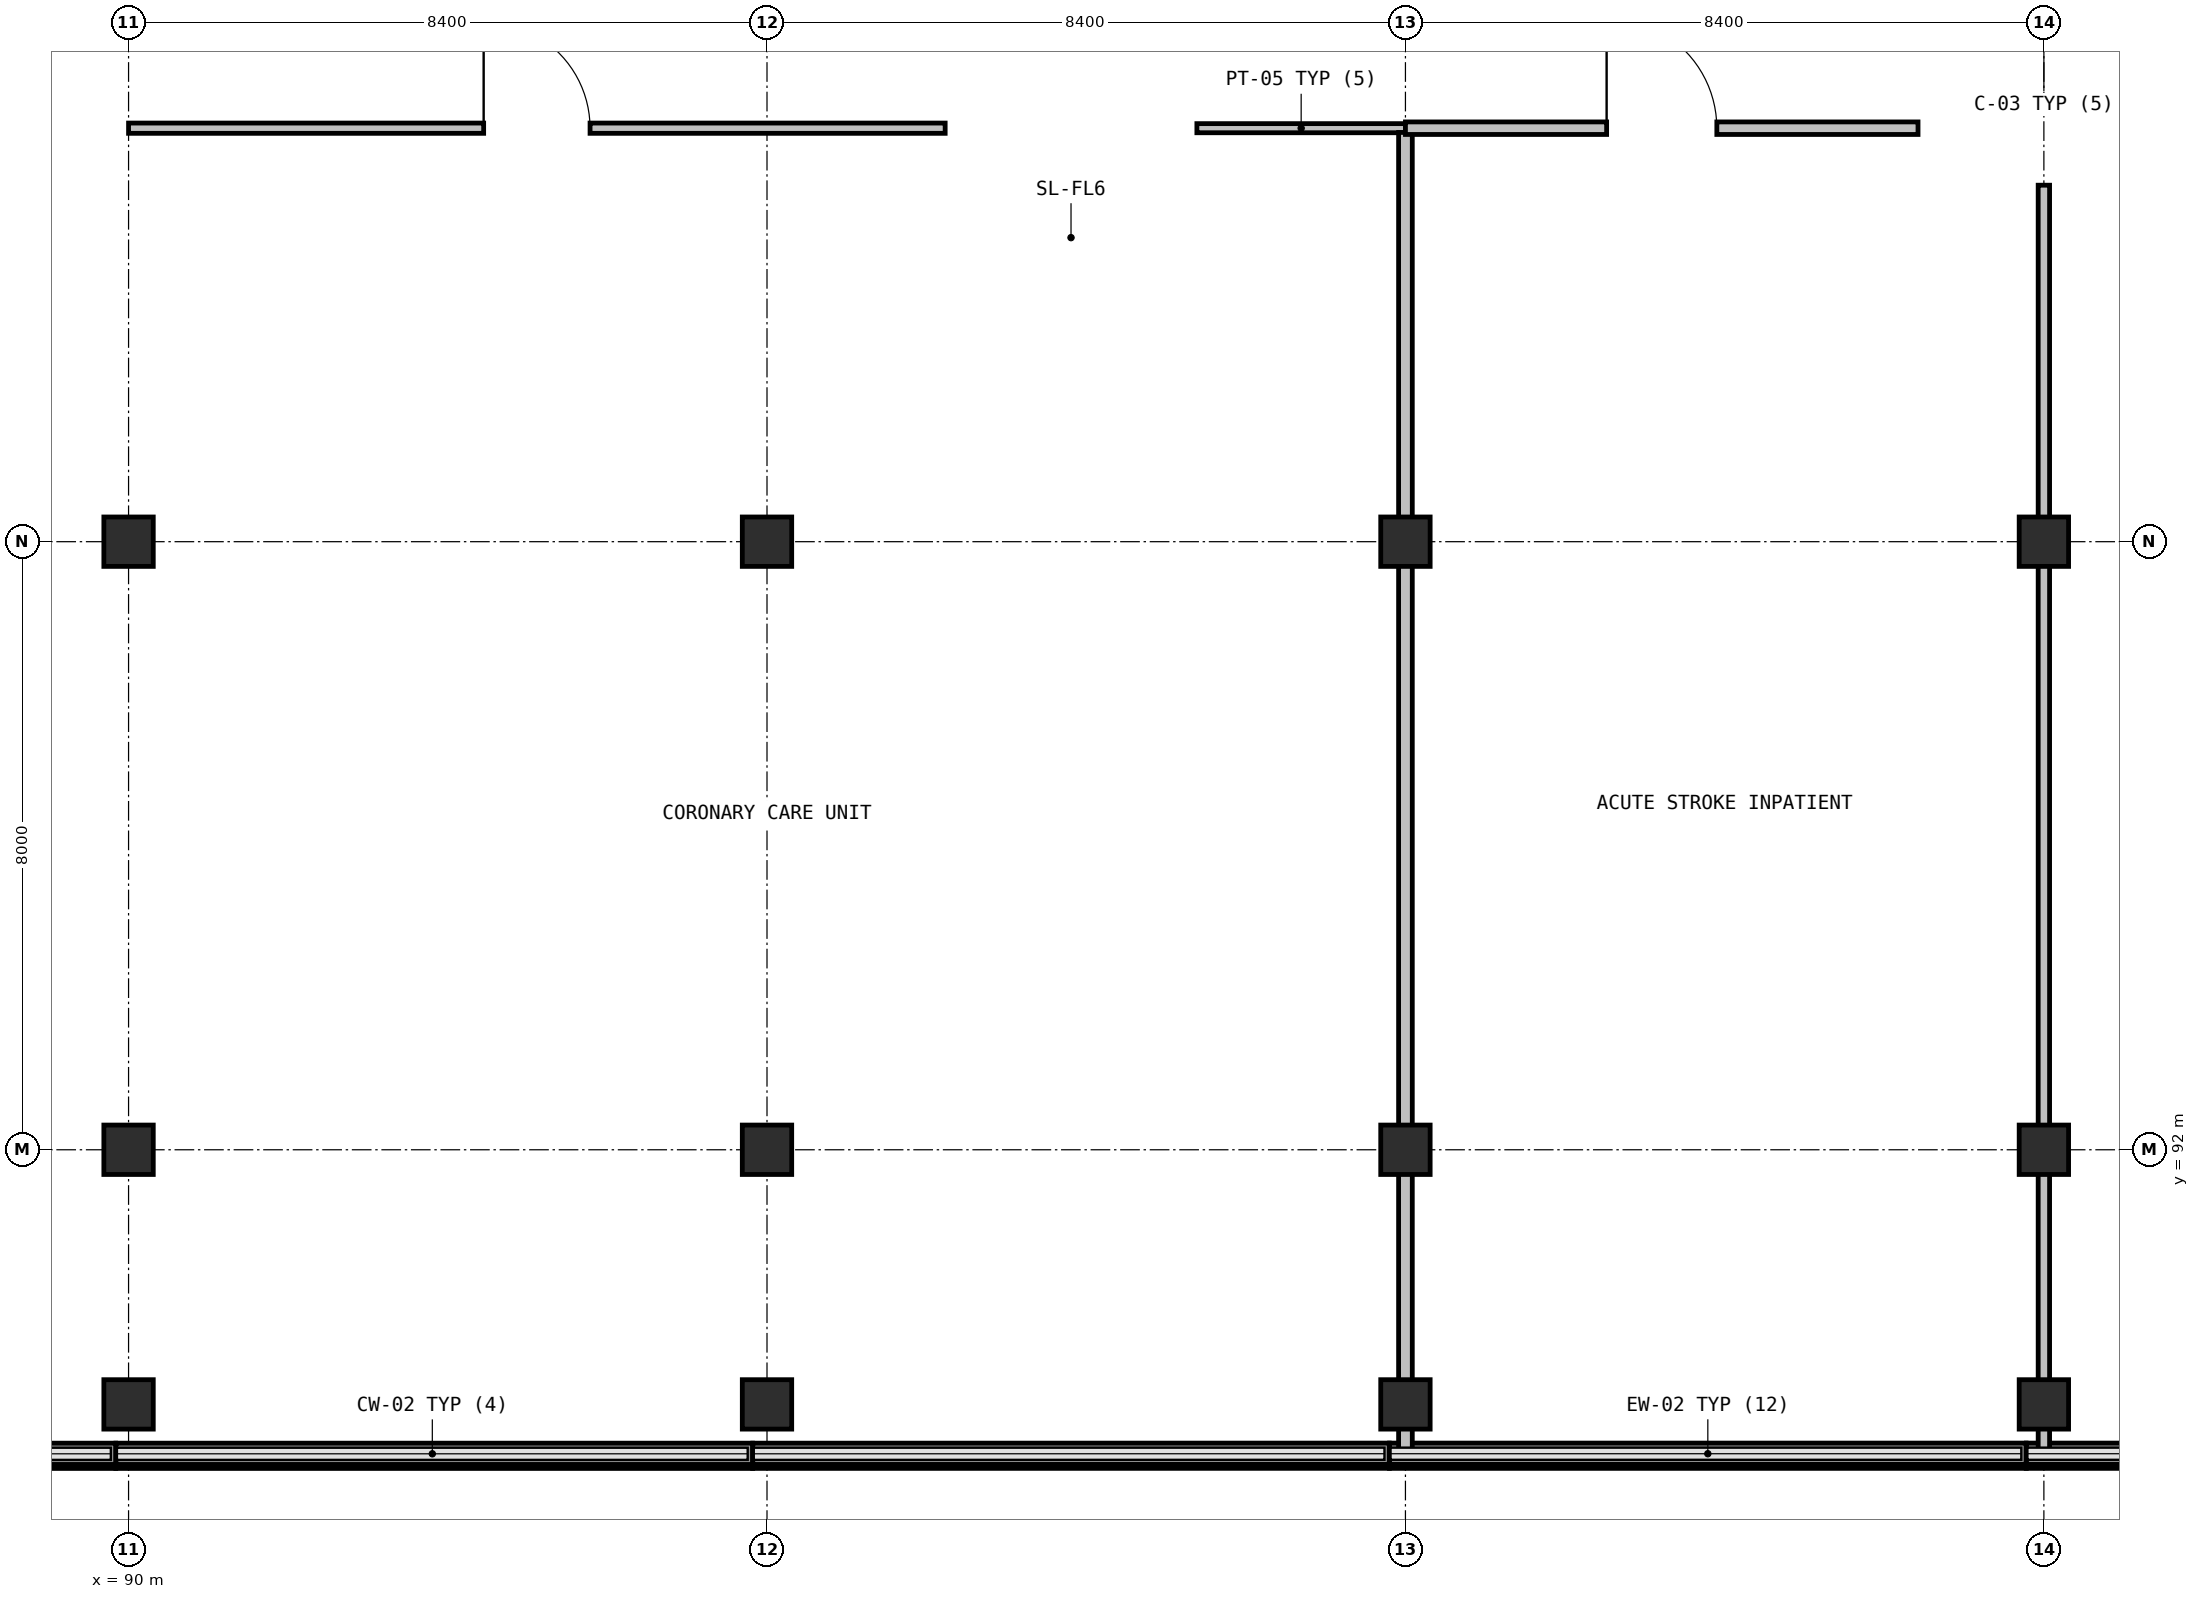
"""IFC4 building model, lengths in metres.
Left out: names, types, materials, properties, quantities, classifications, styles, units other than length and angle.
Written with IfcOpenShell. Run it as: python <this file> out.ifc"""

import sys

from ifc_helpers import new_model, si_unit, direction, frame, frame_2d, origin, origin_2d, place, context, subcontext, project, spatial, rectangle, extrude, element, fill, save


model = new_model("IFC4")
c1 = context("Model", 3, precision=1e-05, world=origin(), true_north=direction((0.0, 1.0)))
c2 = subcontext(c1, "Body", "Model", "MODEL_VIEW")
j1 = project(units=[si_unit("LENGTHUNIT", "METRE"), si_unit("PLANEANGLEUNIT", "RADIAN")], contexts=[c1])
p1 = place(None, origin())
s1 = spatial("IfcSite", under=j1, at=p1, CompositionType="ELEMENT")
p2 = place(p1, origin())
s2 = spatial("IfcBuilding", under=s1, at=p2, CompositionType="ELEMENT")
p3 = place(p2, frame((0.0, 0.0, 27.3)))
s3 = spatial("IfcBuildingStorey", under=s2, at=p3, CompositionType="ELEMENT", Elevation=27.3)
for number, where, z_axis, x_axis in (
    (1, (90.0, 88.65, 0.0), (0.0, 0.0, 1.0), (1.0, 0.0, 0.0)),
    (2, (90.0, 92.0, 0.0), (0.0, 0.0, 1.0), (1.0, 0.0, 0.0)),
    (3, (90.0, 100.0, 0.0), (0.0, 0.0, 1.0), (1.0, 0.0, 0.0)),
    (4, (98.4, 88.65, 0.0), (0.0, 0.0, 1.0), (1.0, 0.0, 0.0)),
    (5, (98.4, 92.0, 0.0), (0.0, 0.0, 1.0), (1.0, 0.0, 0.0)),
    (6, (98.4, 100.0, 0.0), (0.0, 0.0, 1.0), (1.0, 0.0, 0.0)),
    (7, (106.8, 88.65, 0.0), (0.0, 0.0, 1.0), (1.0, 0.0, 0.0)),
    (8, (106.8, 92.0, 0.0), (0.0, 0.0, 1.0), (1.0, 0.0, 0.0)),
    (9, (106.8, 100.0, 0.0), (0.0, 0.0, 1.0), (1.0, 0.0, 0.0)),
    (10, (115.2, 88.65, 0.0), (0.0, 0.0, 1.0), (1.0, 0.0, 0.0)),
    (11, (115.2, 92.0, 0.0), (0.0, 0.0, 1.0), (1.0, 0.0, 0.0)),
    (12, (115.2, 100.0, 0.0), (0.0, 0.0, 1.0), (1.0, 0.0, 0.0)),
):
    element("IfcColumn", number, at=place(p3, frame(where, z_axis=z_axis, x_axis=x_axis)), inside=s3, PredefinedType="COLUMN", context=c2, shape_type="SweptSolid", body=[
        extrude(rectangle(XDim=0.65, YDim=0.65, at=origin_2d()), origin(), (0.0, 0.0, 1.0), 4.05),
    ])
for number, where, z_axis, x_axis in (
    (13, (123.345, 88.001, 0.0), (0.0, 0.0, 1.0), (-1.0, 0.0, 0.0)),
    (14, (114.966, 88.001, 0.0), (0.0, 0.0, 1.0), (-1.0, 0.0, 0.0)),
):
    element("IfcWall", number, at=place(p3, frame(where, z_axis=z_axis, x_axis=x_axis)), inside=s3, PredefinedType="SOLIDWALL", context=c2, shape_type="SweptSolid", body=[
        extrude(rectangle(XDim=8.375, YDim=0.28, at=frame_2d((4.188, 0.0))), origin(), (0.0, 0.0, 1.0), 0.94),
    ])
p4 = place(p3, frame((106.587, 88.001, 0.0), z_axis=(0.0, 0.0, 1.0), x_axis=(-0.9999999932, -0.000116618075, 0.0)))
e15 = element("IfcWall", 15, at=p4, inside=s3, PredefinedType="SOLIDWALL", context=c2, shape_type="SweptSolid", body=[
    extrude(rectangle(XDim=8.374, YDim=0.28, at=frame_2d((4.187, 0.0))), origin(), (0.0, 0.0, 1.0), 0.94),
])
for number, where, z_axis, x_axis in (
    (16, (98.209, 88.0, 0.0), (0.0, 0.0, 1.0), (-1.0, 0.0, 0.0)),
    (17, (89.83, 88.0, 0.0), (0.0, 0.0, 1.0), (-1.0, 0.0, 0.0)),
):
    element("IfcWall", number, at=place(p3, frame(where, z_axis=z_axis, x_axis=x_axis)), inside=s3, PredefinedType="SOLIDWALL", context=c2, shape_type="SweptSolid", body=[
        extrude(rectangle(XDim=8.375, YDim=0.28, at=frame_2d((4.188, 0.0))), origin(), (0.0, 0.0, 1.0), 0.94),
    ])
p5 = place(p3, frame((90.0, 105.44, 0.0), z_axis=(0.0, 0.0, 1.0), x_axis=(1.0, 0.0, 0.0)))
e18 = element("IfcWall", 18, at=p5, inside=s3, PredefinedType="PARTITIONING", context=c2, shape_type="SweptSolid", body=[
    extrude(rectangle(XDim=10.744, YDim=0.135, at=frame_2d((5.372, 0.0))), origin(), (0.0, 0.0, 1.0), 3.78),
])
p6 = place(p5, frame((4.672, 0.0, 0.0)))
e19 = element("IfcOpeningElement", 19, at=p6, cuts=e18, PredefinedType="OPENING", context=c2, shape_type="SweptSolid", body=[
    extrude(rectangle(XDim=1.4, YDim=2.15, at=frame_2d((0.7, 1.075))), frame((0.0, 0.077, 0.0), z_axis=(0.0, -1.0, 0.0), x_axis=(1.0, 0.0, 0.0)), (0.0, 0.0, 1.0), 0.155),
])
p7 = place(p3, frame((104.056, 105.44, 0.0), z_axis=(0.0, 0.0, 1.0), x_axis=(1.0, 0.0, 0.0)))
e20 = element("IfcWall", 20, at=p7, inside=s3, PredefinedType="PARTITIONING", context=c2, shape_type="SweptSolid", body=[
    extrude(rectangle(XDim=2.744, YDim=0.12, at=frame_2d((1.372, 0.0))), origin(), (0.0, 0.0, 1.0), 3.78),
])
p8 = place(p3, frame((106.8, 105.384, 0.0), z_axis=(0.0, 0.0, 1.0), x_axis=(0.0, -1.0, 0.0)))
e21 = element("IfcWall", 21, at=p8, inside=s3, PredefinedType="PARTITIONING", context=c2, shape_type="SweptSolid", body=[
    extrude(rectangle(XDim=17.341, YDim=0.18, at=frame_2d((8.67, 0.0))), origin(), (0.0, 0.0, 1.0), 3.18),
])
p9 = place(p3, frame((106.8, 105.44, 0.0), z_axis=(0.0, 0.0, 1.0), x_axis=(1.0, 0.0, 0.0)))
e22 = element("IfcWall", 22, at=p9, inside=s3, PredefinedType="PARTITIONING", context=c2, shape_type="SweptSolid", body=[
    extrude(rectangle(XDim=6.744, YDim=0.165, at=frame_2d((3.372, 0.0))), origin(), (0.0, 0.0, 1.0), 3.78),
])
p10 = place(p9, frame((2.647, 0.0, 0.0)))
e23 = element("IfcOpeningElement", 23, at=p10, cuts=e22, PredefinedType="OPENING", context=c2, shape_type="SweptSolid", body=[
    extrude(rectangle(XDim=1.45, YDim=2.15, at=frame_2d((0.725, 1.075))), frame((0.0, 0.093, 0.0), z_axis=(0.0, -1.0, 0.0), x_axis=(1.0, 0.0, 0.0)), (0.0, 0.0, 1.0), 0.185),
])
p11 = place(p3, frame((115.2, 104.69, 0.0), z_axis=(0.0, 0.0, 1.0), x_axis=(0.0, -1.0, 0.0)))
e24 = element("IfcWall", 24, at=p11, inside=s3, PredefinedType="PARTITIONING", context=c2, shape_type="SweptSolid", body=[
    extrude(rectangle(XDim=16.647, YDim=0.15, at=frame_2d((8.323, 0.0))), origin(), (0.0, 0.0, 1.0), 3.18),
])
p12 = place(p6, origin())
e25 = element("IfcDoor", 25, at=p12, inside=s3, OperationType="SINGLE_SWING_LEFT", PredefinedType="DOOR", context=c2, shape_type="SweptSolid", body=[
    extrude(rectangle(XDim=1.4, YDim=2.15, at=frame_2d((0.7, 1.075))), frame((0.0, 0.025, 0.0), z_axis=(0.0, -1.0, 0.0), x_axis=(1.0, 0.0, 0.0)), (0.0, 0.0, 1.0), 0.05),
])
fill(e19, e25)
p13 = place(p10, origin())
e26 = element("IfcDoor", 26, at=p13, inside=s3, OperationType="SINGLE_SWING_RIGHT", PredefinedType="DOOR", context=c2, shape_type="SweptSolid", body=[
    extrude(rectangle(XDim=1.45, YDim=2.15, at=frame_2d((0.725, 1.075))), frame((0.0, 0.025, 0.0), z_axis=(0.0, -1.0, 0.0), x_axis=(1.0, 0.0, 0.0)), (0.0, 0.0, 1.0), 0.05),
])
fill(e23, e26)
save(model, sys.argv[1])
